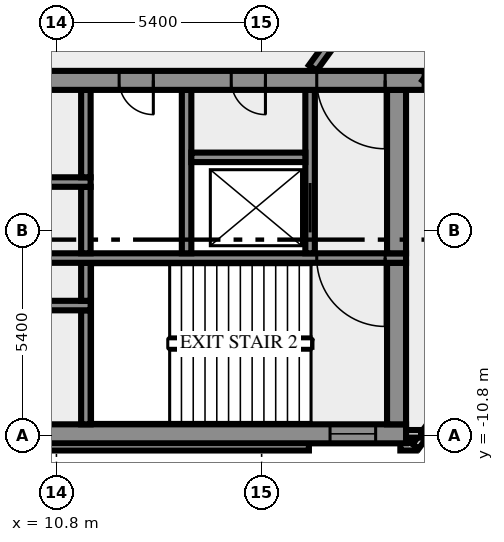
"""IFC4 building model, lengths in metres.
Left out: names, types, materials, properties, quantities, classifications, styles, units other than length and angle.
Written with IfcOpenShell. Run it as: python <this file> out.ifc"""

import sys

from ifc_helpers import new_model, si_unit, direction, frame, frame_2d, origin, place, context, subcontext, project, spatial, rectangle, extrude, element, fill, save


model = new_model("IFC4")
c1 = context("Model", 3, precision=1e-05, world=origin(), true_north=direction((0.0, 1.0)))
c2 = subcontext(c1, "Body", "Model", "MODEL_VIEW")
j1 = project(units=[si_unit("LENGTHUNIT", "METRE"), si_unit("PLANEANGLEUNIT", "RADIAN")], contexts=[c1])
p1 = place(None, origin())
s1 = spatial("IfcSite", under=j1, at=p1, CompositionType="ELEMENT")
p2 = place(p1, origin())
s2 = spatial("IfcBuilding", under=s1, at=p2, CompositionType="ELEMENT")
p3 = place(p2, frame((0.0, 0.0, 331.0)))
s3 = spatial("IfcBuildingStorey", under=s2, at=p3, CompositionType="ELEMENT", Elevation=331.0)
p4 = place(p3, frame((-17.444, -11.088, 0.0), z_axis=(0.0, 0.0, 1.0), x_axis=(1.0, 0.0, 0.0)))
e1 = element("IfcWall", 1, at=p4, inside=s3, PredefinedType="SOLIDWALL", context=c2, shape_type="SweptSolid", body=[
    extrude(rectangle(XDim=34.888, YDim=0.2, at=frame_2d((17.444, 0.0))), origin(), (0.0, 0.0, 1.0), 3.65),
])
p5 = place(p3, frame((19.85, -11.088, 0.0), z_axis=(0.0, 0.0, 1.0), x_axis=(1.0, 0.0, 0.0)))
e2 = element("IfcWall", 2, at=p5, inside=s3, PredefinedType="SOLIDWALL", context=c2, shape_type="SweptSolid", body=[
    extrude(rectangle(XDim=0.406, YDim=0.2, at=frame_2d((0.203, 0.0))), origin(), (0.0, 0.0, 1.0), 3.65),
])
p6 = place(p3, frame((20.253, -11.083, 0.0), z_axis=(0.0, 0.0, 1.0), x_axis=(0.587766567315, 0.809030569476, 0.0)))
e3 = element("IfcWall", 3, at=p6, inside=s3, PredefinedType="SOLIDWALL", context=c2, shape_type="SweptSolid", body=[
    extrude(rectangle(XDim=2.688, YDim=0.2, at=frame_2d((1.344, 0.0))), origin(), (0.0, 0.0, 1.0), 3.65),
])
p7 = place(p3, frame((19.98, -10.75, 0.0), z_axis=(0.0, 0.0, 1.0), x_axis=(1.0, 0.0, 0.0)))
e4 = element("IfcWall", 4, at=p7, inside=s3, PredefinedType="SOLIDWALL", context=c2, shape_type="SweptSolid", body=[
    extrude(rectangle(XDim=0.417, YDim=0.2, at=frame_2d((0.208, 0.0))), origin(), (0.0, 0.0, 1.0), 3.65),
])
p8 = place(p3, frame((-20.0, -10.75, 0.0), z_axis=(0.0, 0.0, 1.0), x_axis=(1.0, 0.0, 0.0)))
e5 = element("IfcWall", 5, at=p8, inside=s3, PredefinedType="SHEAR", context=c2, shape_type="SweptSolid", body=[
    extrude(rectangle(XDim=40.0, YDim=0.5, at=frame_2d((20.0, 0.0))), origin(), (0.0, 0.0, 1.0), 3.65),
])
p9 = place(p8, frame((0.8, 0.0, 1.0)))
e6 = element("IfcOpeningElement", 6, at=p9, cuts=e5, PredefinedType="OPENING", context=c2, shape_type="SweptSolid", body=[
    extrude(rectangle(XDim=1.2, YDim=1.2, at=frame_2d((0.6, 0.6))), frame((0.0, 0.26, 0.0), z_axis=(0.0, -1.0, 0.0), x_axis=(1.0, 0.0, 0.0)), (0.0, 0.0, 1.0), 0.52),
])
p10 = place(p8, frame((38.0, 0.0, 1.0)))
e7 = element("IfcOpeningElement", 7, at=p10, cuts=e5, PredefinedType="OPENING", context=c2, shape_type="SweptSolid", body=[
    extrude(rectangle(XDim=1.2, YDim=1.2, at=frame_2d((0.6, 0.6))), frame((0.0, 0.26, 0.0), z_axis=(0.0, -1.0, 0.0), x_axis=(1.0, 0.0, 0.0)), (0.0, 0.0, 1.0), 0.52),
])
p11 = place(p3, frame((11.575, -10.5, 0.0), z_axis=(0.0, 0.0, 1.0), x_axis=(0.0, 1.0, 0.0)))
e8 = element("IfcWall", 8, at=p11, inside=s3, PredefinedType="SHEAR", context=c2, shape_type="SweptSolid", body=[
    extrude(rectangle(XDim=3.0, YDim=0.25, at=frame_2d((1.5, 0.0))), origin(), (0.0, 0.0, 1.0), 3.65),
])
p12 = place(p3, frame((19.75, -10.5, 0.0), z_axis=(0.0, 0.0, 1.0), x_axis=(0.0, 1.0, 0.0)))
e9 = element("IfcWall", 9, at=p12, inside=s3, PredefinedType="SHEAR", context=c2, shape_type="SweptSolid", body=[
    extrude(rectangle(XDim=4.25, YDim=0.5, at=frame_2d((2.125, 0.0))), origin(), (0.0, 0.0, 1.0), 3.65),
])
p13 = place(p3, frame((11.7, -7.375, 0.0), z_axis=(0.0, 0.0, 1.0), x_axis=(-1.0, 0.0, 0.0)))
e10 = element("IfcWall", 10, at=p13, inside=s3, PredefinedType="SHEAR", context=c2, shape_type="SweptSolid", body=[
    extrude(rectangle(XDim=23.4, YDim=0.25, at=frame_2d((11.7, 0.0))), origin(), (0.0, 0.0, 1.0), 3.65),
])
p14 = place(p13, frame((22.225, 0.0, 0.0)))
e11 = element("IfcOpeningElement", 11, at=p14, cuts=e10, PredefinedType="OPENING", context=c2, shape_type="SweptSolid", body=[
    extrude(rectangle(XDim=0.8, YDim=2.1, at=frame_2d((0.4, 1.05))), frame((0.0, 0.135, 0.0), z_axis=(0.0, -1.0, 0.0), x_axis=(1.0, 0.0, 0.0)), (0.0, 0.0, 1.0), 0.27),
])
p15 = place(p13, frame((20.2, 0.0, 0.0)))
e12 = element("IfcOpeningElement", 12, at=p15, cuts=e10, PredefinedType="OPENING", context=c2, shape_type="SweptSolid", body=[
    extrude(rectangle(XDim=1.1, YDim=2.1, at=frame_2d((0.55, 1.05))), frame((0.0, 0.135, 0.0), z_axis=(0.0, -1.0, 0.0), x_axis=(1.0, 0.0, 0.0)), (0.0, 0.0, 1.0), 0.27),
])
p16 = place(p13, frame((17.7, 0.0, 0.0)))
e13 = element("IfcOpeningElement", 13, at=p16, cuts=e10, PredefinedType="OPENING", context=c2, shape_type="SweptSolid", body=[
    extrude(rectangle(XDim=1.1, YDim=2.1, at=frame_2d((0.55, 1.05))), frame((0.0, 0.135, 0.0), z_axis=(0.0, -1.0, 0.0), x_axis=(1.0, 0.0, 0.0)), (0.0, 0.0, 1.0), 0.27),
])
p17 = place(p13, frame((15.975, 0.0, 0.0)))
e14 = element("IfcOpeningElement", 14, at=p17, cuts=e10, PredefinedType="OPENING", context=c2, shape_type="SweptSolid", body=[
    extrude(rectangle(XDim=0.8, YDim=2.1, at=frame_2d((0.4, 1.05))), frame((0.0, 0.135, 0.0), z_axis=(0.0, -1.0, 0.0), x_axis=(1.0, 0.0, 0.0)), (0.0, 0.0, 1.0), 0.27),
])
p18 = place(p13, frame((14.2, 0.0, 0.0)))
e15 = element("IfcOpeningElement", 15, at=p18, cuts=e10, PredefinedType="OPENING", context=c2, shape_type="SweptSolid", body=[
    extrude(rectangle(XDim=0.9, YDim=2.1, at=frame_2d((0.45, 1.05))), frame((0.0, 0.135, 0.0), z_axis=(0.0, -1.0, 0.0), x_axis=(1.0, 0.0, 0.0)), (0.0, 0.0, 1.0), 0.27),
])
p19 = place(p13, frame((12.35, 0.0, 0.0)))
e16 = element("IfcOpeningElement", 16, at=p19, cuts=e10, PredefinedType="OPENING", context=c2, shape_type="SweptSolid", body=[
    extrude(rectangle(XDim=0.9, YDim=2.1, at=frame_2d((0.45, 1.05))), frame((0.0, 0.135, 0.0), z_axis=(0.0, -1.0, 0.0), x_axis=(1.0, 0.0, 0.0)), (0.0, 0.0, 1.0), 0.27),
])
p20 = place(p13, frame((10.65, 0.0, 0.0)))
e17 = element("IfcOpeningElement", 17, at=p20, cuts=e10, PredefinedType="OPENING", context=c2, shape_type="SweptSolid", body=[
    extrude(rectangle(XDim=0.9, YDim=2.1, at=frame_2d((0.45, 1.05))), frame((0.0, 0.135, 0.0), z_axis=(0.0, -1.0, 0.0), x_axis=(1.0, 0.0, 0.0)), (0.0, 0.0, 1.0), 0.27),
])
p21 = place(p13, frame((7.713, 0.0, 0.0)))
e18 = element("IfcOpeningElement", 18, at=p21, cuts=e10, PredefinedType="OPENING", context=c2, shape_type="SweptSolid", body=[
    extrude(rectangle(XDim=0.9, YDim=2.1, at=frame_2d((0.45, 1.05))), frame((0.0, 0.135, 0.0), z_axis=(0.0, -1.0, 0.0), x_axis=(1.0, 0.0, 0.0)), (0.0, 0.0, 1.0), 0.27),
])
p22 = place(p13, frame((4.15, 0.0, 0.0)))
e19 = element("IfcOpeningElement", 19, at=p22, cuts=e10, PredefinedType="OPENING", context=c2, shape_type="SweptSolid", body=[
    extrude(rectangle(XDim=0.9, YDim=2.1, at=frame_2d((0.45, 1.05))), frame((0.0, 0.135, 0.0), z_axis=(0.0, -1.0, 0.0), x_axis=(1.0, 0.0, 0.0)), (0.0, 0.0, 1.0), 0.27),
])
p23 = place(p13, frame((1.138, 0.0, 0.0)))
e20 = element("IfcOpeningElement", 20, at=p23, cuts=e10, PredefinedType="OPENING", context=c2, shape_type="SweptSolid", body=[
    extrude(rectangle(XDim=0.9, YDim=2.1, at=frame_2d((0.45, 1.05))), frame((0.0, 0.135, 0.0), z_axis=(0.0, -1.0, 0.0), x_axis=(1.0, 0.0, 0.0)), (0.0, 0.0, 1.0), 0.27),
])
p24 = place(p3, frame((11.575, -7.25, 0.0), z_axis=(0.0, 0.0, 1.0), x_axis=(0.0, 1.0, 0.0)))
e21 = element("IfcWall", 21, at=p24, inside=s3, PredefinedType="SHEAR", context=c2, shape_type="SweptSolid", body=[
    extrude(rectangle(XDim=1.0, YDim=0.25, at=frame_2d((0.5, 0.0))), origin(), (0.0, 0.0, 1.0), 3.65),
])
p25 = place(p3, frame((20.0, -6.125, 0.0), z_axis=(0.0, 0.0, 1.0), x_axis=(-1.0, 0.0, 0.0)))
e22 = element("IfcWall", 22, at=p25, inside=s3, PredefinedType="SHEAR", context=c2, shape_type="SweptSolid", body=[
    extrude(rectangle(XDim=10.8, YDim=0.25, at=frame_2d((5.4, 0.0))), origin(), (0.0, 0.0, 1.0), 3.65),
])
p26 = place(p25, frame((0.55, 0.0, 0.0)))
e23 = element("IfcOpeningElement", 23, at=p26, cuts=e22, PredefinedType="OPENING", context=c2, shape_type="SweptSolid", body=[
    extrude(rectangle(XDim=1.8, YDim=2.1, at=frame_2d((0.9, 1.05))), frame((0.0, 0.135, 0.0), z_axis=(0.0, -1.0, 0.0), x_axis=(1.0, 0.0, 0.0)), (0.0, 0.0, 1.0), 0.27),
])
p27 = place(p3, frame((11.575, -6.0, 0.0), z_axis=(0.0, 0.0, 1.0), x_axis=(0.0, 1.0, 0.0)))
e24 = element("IfcWall", 24, at=p27, inside=s3, PredefinedType="SHEAR", context=c2, shape_type="SweptSolid", body=[
    extrude(rectangle(XDim=1.75, YDim=0.25, at=frame_2d((0.875, 0.0))), origin(), (0.0, 0.0, 1.0), 3.65),
])
p28 = place(p3, frame((14.225, -6.0, 0.0), z_axis=(0.0, 0.0, 1.0), x_axis=(0.0, 1.0, 0.0)))
e25 = element("IfcWall", 25, at=p28, inside=s3, PredefinedType="SHEAR", context=c2, shape_type="SweptSolid", body=[
    extrude(rectangle(XDim=4.3, YDim=0.25, at=frame_2d((2.15, 0.0))), origin(), (0.0, 0.0, 1.0), 3.65),
])
p29 = place(p3, frame((17.475, -6.0, 0.0), z_axis=(0.0, 0.0, 1.0), x_axis=(0.0, 1.0, 0.0)))
e26 = element("IfcWall", 26, at=p29, inside=s3, PredefinedType="SHEAR", context=c2, shape_type="SweptSolid", body=[
    extrude(rectangle(XDim=4.3, YDim=0.25, at=frame_2d((2.15, 0.0))), origin(), (0.0, 0.0, 1.0), 3.65),
])
p30 = place(p29, frame((0.55, 0.0, 0.0)))
e27 = element("IfcOpeningElement", 27, at=p30, cuts=e26, PredefinedType="OPENING", context=c2, shape_type="SweptSolid", body=[
    extrude(rectangle(XDim=1.3, YDim=2.1, at=frame_2d((0.65, 1.05))), frame((0.0, 0.135, 0.0), z_axis=(0.0, -1.0, 0.0), x_axis=(1.0, 0.0, 0.0)), (0.0, 0.0, 1.0), 0.27),
])
p31 = place(p3, frame((19.75, -6.0, 0.0), z_axis=(0.0, 0.0, 1.0), x_axis=(0.0, 1.0, 0.0)))
e28 = element("IfcWall", 28, at=p31, inside=s3, PredefinedType="SHEAR", context=c2, shape_type="SweptSolid", body=[
    extrude(rectangle(XDim=4.3, YDim=0.5, at=frame_2d((2.15, 0.0))), origin(), (0.0, 0.0, 1.0), 3.65),
])
p32 = place(p3, frame((1.45, -4.125, 0.0), z_axis=(0.0, 0.0, 1.0), x_axis=(1.0, 0.0, 0.0)))
e29 = element("IfcWall", 29, at=p32, inside=s3, PredefinedType="SHEAR", context=c2, shape_type="SweptSolid", body=[
    extrude(rectangle(XDim=10.25, YDim=0.25, at=frame_2d((5.125, 0.0))), origin(), (0.0, 0.0, 1.0), 3.65),
])
p33 = place(p32, frame((0.7, 0.0, 0.0)))
e30 = element("IfcOpeningElement", 30, at=p33, cuts=e29, PredefinedType="OPENING", context=c2, shape_type="SweptSolid", body=[
    extrude(rectangle(XDim=1.3, YDim=2.1, at=frame_2d((0.65, 1.05))), frame((0.0, 0.135, 0.0), z_axis=(0.0, -1.0, 0.0), x_axis=(1.0, 0.0, 0.0)), (0.0, 0.0, 1.0), 0.27),
])
p34 = place(p3, frame((11.575, -4.0, 0.0), z_axis=(0.0, 0.0, 1.0), x_axis=(0.0, 1.0, 0.0)))
e31 = element("IfcWall", 31, at=p34, inside=s3, PredefinedType="SHEAR", context=c2, shape_type="SweptSolid", body=[
    extrude(rectangle(XDim=2.3, YDim=0.25, at=frame_2d((1.15, 0.0))), origin(), (0.0, 0.0, 1.0), 3.65),
])
p35 = place(p3, frame((14.35, -3.475, 0.0), z_axis=(0.0, 0.0, 1.0), x_axis=(1.0, 0.0, 0.0)))
e32 = element("IfcWall", 32, at=p35, inside=s3, PredefinedType="SHEAR", context=c2, shape_type="SweptSolid", body=[
    extrude(rectangle(XDim=3.0, YDim=0.25, at=frame_2d((1.5, 0.0))), origin(), (0.0, 0.0, 1.0), 3.65),
])
p36 = place(p3, frame((20.49, -1.45, 0.0), z_axis=(0.0, 0.0, 1.0), x_axis=(-1.0, 0.0, 0.0)))
e33 = element("IfcWall", 33, at=p36, inside=s3, PredefinedType="SHEAR", context=c2, shape_type="SweptSolid", body=[
    extrude(rectangle(XDim=40.98, YDim=0.5, at=frame_2d((20.49, 0.0))), origin(), (0.0, 0.0, 1.0), 3.65),
])
p37 = place(p36, frame((38.14, 0.0, 0.0)))
e34 = element("IfcOpeningElement", 34, at=p37, cuts=e33, PredefinedType="OPENING", context=c2, shape_type="SweptSolid", body=[
    extrude(rectangle(XDim=1.8, YDim=2.1, at=frame_2d((0.9, 1.05))), frame((0.0, 0.26, 0.0), z_axis=(0.0, -1.0, 0.0), x_axis=(1.0, 0.0, 0.0)), (0.0, 0.0, 1.0), 0.52),
])
p38 = place(p36, frame((36.728, 0.0, 0.0)))
e35 = element("IfcOpeningElement", 35, at=p38, cuts=e33, PredefinedType="OPENING", context=c2, shape_type="SweptSolid", body=[
    extrude(rectangle(XDim=0.8, YDim=2.1, at=frame_2d((0.4, 1.05))), frame((0.0, 0.26, 0.0), z_axis=(0.0, -1.0, 0.0), x_axis=(1.0, 0.0, 0.0)), (0.0, 0.0, 1.0), 0.52),
])
p39 = place(p36, frame((35.153, 0.0, 0.0)))
e36 = element("IfcOpeningElement", 36, at=p39, cuts=e33, PredefinedType="OPENING", context=c2, shape_type="SweptSolid", body=[
    extrude(rectangle(XDim=0.8, YDim=2.1, at=frame_2d((0.4, 1.05))), frame((0.0, 0.26, 0.0), z_axis=(0.0, -1.0, 0.0), x_axis=(1.0, 0.0, 0.0)), (0.0, 0.0, 1.0), 0.52),
])
p40 = place(p36, frame((32.94, 0.0, 0.0)))
e37 = element("IfcOpeningElement", 37, at=p40, cuts=e33, PredefinedType="OPENING", context=c2, shape_type="SweptSolid", body=[
    extrude(rectangle(XDim=0.9, YDim=2.1, at=frame_2d((0.45, 1.05))), frame((0.0, 0.26, 0.0), z_axis=(0.0, -1.0, 0.0), x_axis=(1.0, 0.0, 0.0)), (0.0, 0.0, 1.0), 0.52),
])
p41 = place(p36, frame((31.015, 0.0, 0.0)))
e38 = element("IfcOpeningElement", 38, at=p41, cuts=e33, PredefinedType="OPENING", context=c2, shape_type="SweptSolid", body=[
    extrude(rectangle(XDim=0.8, YDim=2.1, at=frame_2d((0.4, 1.05))), frame((0.0, 0.26, 0.0), z_axis=(0.0, -1.0, 0.0), x_axis=(1.0, 0.0, 0.0)), (0.0, 0.0, 1.0), 0.52),
])
p42 = place(p36, frame((24.765, 0.0, 0.0)))
e39 = element("IfcOpeningElement", 39, at=p42, cuts=e33, PredefinedType="OPENING", context=c2, shape_type="SweptSolid", body=[
    extrude(rectangle(XDim=0.8, YDim=2.1, at=frame_2d((0.4, 1.05))), frame((0.0, 0.26, 0.0), z_axis=(0.0, -1.0, 0.0), x_axis=(1.0, 0.0, 0.0)), (0.0, 0.0, 1.0), 0.52),
])
p43 = place(p36, frame((19.59, 0.0, 0.0)))
e40 = element("IfcOpeningElement", 40, at=p43, cuts=e33, PredefinedType="OPENING", context=c2, shape_type="SweptSolid", body=[
    extrude(rectangle(XDim=2.0, YDim=2.1, at=frame_2d((1.0, 1.05))), frame((0.0, 0.26, 0.0), z_axis=(0.0, -1.0, 0.0), x_axis=(1.0, 0.0, 0.0)), (0.0, 0.0, 1.0), 0.52),
])
p44 = place(p36, frame((15.103, 0.0, 0.0)))
e41 = element("IfcOpeningElement", 41, at=p44, cuts=e33, PredefinedType="OPENING", context=c2, shape_type="SweptSolid", body=[
    extrude(rectangle(XDim=0.9, YDim=2.1, at=frame_2d((0.45, 1.05))), frame((0.0, 0.26, 0.0), z_axis=(0.0, -1.0, 0.0), x_axis=(1.0, 0.0, 0.0)), (0.0, 0.0, 1.0), 0.52),
])
p45 = place(p36, frame((13.04, 0.0, 0.0)))
e42 = element("IfcOpeningElement", 42, at=p45, cuts=e33, PredefinedType="OPENING", context=c2, shape_type="SweptSolid", body=[
    extrude(rectangle(XDim=0.9, YDim=2.1, at=frame_2d((0.45, 1.05))), frame((0.0, 0.26, 0.0), z_axis=(0.0, -1.0, 0.0), x_axis=(1.0, 0.0, 0.0)), (0.0, 0.0, 1.0), 0.52),
])
p46 = place(p36, frame((10.177, 0.0, 0.0)))
e43 = element("IfcOpeningElement", 43, at=p46, cuts=e33, PredefinedType="OPENING", context=c2, shape_type="SweptSolid", body=[
    extrude(rectangle(XDim=0.9, YDim=2.1, at=frame_2d((0.45, 1.05))), frame((0.0, 0.26, 0.0), z_axis=(0.0, -1.0, 0.0), x_axis=(1.0, 0.0, 0.0)), (0.0, 0.0, 1.0), 0.52),
])
p47 = place(p36, frame((7.14, 0.0, 0.0)))
e44 = element("IfcOpeningElement", 44, at=p47, cuts=e33, PredefinedType="OPENING", context=c2, shape_type="SweptSolid", body=[
    extrude(rectangle(XDim=0.9, YDim=2.1, at=frame_2d((0.45, 1.05))), frame((0.0, 0.26, 0.0), z_axis=(0.0, -1.0, 0.0), x_axis=(1.0, 0.0, 0.0)), (0.0, 0.0, 1.0), 0.52),
])
p48 = place(p36, frame((4.19, 0.0, 0.0)))
e45 = element("IfcOpeningElement", 45, at=p48, cuts=e33, PredefinedType="OPENING", context=c2, shape_type="SweptSolid", body=[
    extrude(rectangle(XDim=0.9, YDim=2.1, at=frame_2d((0.45, 1.05))), frame((0.0, 0.26, 0.0), z_axis=(0.0, -1.0, 0.0), x_axis=(1.0, 0.0, 0.0)), (0.0, 0.0, 1.0), 0.52),
])
p49 = place(p36, frame((1.04, 0.0, 0.0)))
e46 = element("IfcOpeningElement", 46, at=p49, cuts=e33, PredefinedType="OPENING", context=c2, shape_type="SweptSolid", body=[
    extrude(rectangle(XDim=1.8, YDim=2.1, at=frame_2d((0.9, 1.05))), frame((0.0, 0.26, 0.0), z_axis=(0.0, -1.0, 0.0), x_axis=(1.0, 0.0, 0.0)), (0.0, 0.0, 1.0), 0.52),
])
p50 = place(p3, frame((17.545, -1.125, 0.0), z_axis=(0.0, 0.0, 1.0), x_axis=(0.58779555165, 0.809009511354, 0.0)))
e47 = element("IfcWall", 47, at=p50, inside=s3, PredefinedType="SOLIDWALL", context=c2, shape_type="SweptSolid", body=[
    extrude(rectangle(XDim=18.103, YDim=0.25, at=frame_2d((9.052, 0.0))), origin(), (0.0, 0.0, 1.0), 3.65),
])
p51 = place(p50, frame((16.728, 0.0, 0.0)))
e48 = element("IfcOpeningElement", 48, at=p51, cuts=e47, PredefinedType="OPENING", context=c2, shape_type="SweptSolid", body=[
    extrude(rectangle(XDim=0.9, YDim=2.1, at=frame_2d((0.45, 1.05))), frame((0.0, 0.135, 0.0), z_axis=(0.0, -1.0, 0.0), x_axis=(1.0, 0.0, 0.0)), (0.0, 0.0, 1.0), 0.27),
])
p52 = place(p3, frame((30.183, 11.761, 0.0), z_axis=(0.0, 0.0, 1.0), x_axis=(-0.587781762867, -0.80901952958, 0.0)))
e49 = element("IfcWall", 49, at=p52, inside=s3, PredefinedType="SOLIDWALL", context=c2, shape_type="SweptSolid", body=[
    extrude(rectangle(XDim=16.42, YDim=0.25, at=frame_2d((8.21, 0.0))), origin(), (0.0, 0.0, 1.0), 3.65),
])
p53 = place(p52, frame((0.225, 0.0, 0.0)))
e50 = element("IfcOpeningElement", 50, at=p53, cuts=e49, PredefinedType="OPENING", context=c2, shape_type="SweptSolid", body=[
    extrude(rectangle(XDim=0.9, YDim=2.1, at=frame_2d((0.45, 1.05))), frame((0.0, 0.135, 0.0), z_axis=(0.0, -1.0, 0.0), x_axis=(1.0, 0.0, 0.0)), (0.0, 0.0, 1.0), 0.27),
])
p54 = place(p52, frame((9.304, 0.0, 0.0)))
e51 = element("IfcOpeningElement", 51, at=p54, cuts=e49, PredefinedType="OPENING", context=c2, shape_type="SweptSolid", body=[
    extrude(rectangle(XDim=0.9, YDim=2.1, at=frame_2d((0.45, 1.05))), frame((0.0, 0.135, 0.0), z_axis=(0.0, -1.0, 0.0), x_axis=(1.0, 0.0, 0.0)), (0.0, 0.0, 1.0), 0.27),
])
p55 = place(p10, origin())
e52 = element("IfcWindow", 52, at=p55, inside=s3, PartitioningType="SINGLE_PANEL", PredefinedType="WINDOW", context=c2, shape_type="SweptSolid", body=[
    extrude(rectangle(XDim=1.2, YDim=1.2, at=frame_2d((0.6, 0.6))), frame((0.0, 0.03, 0.0), z_axis=(0.0, -1.0, 0.0), x_axis=(1.0, 0.0, 0.0)), (0.0, 0.0, 1.0), 0.06),
])
fill(e7, e52)
p56 = place(p26, origin())
e53 = element("IfcDoor", 53, at=p56, inside=s3, OperationType="DOUBLE_DOOR_SINGLE_SWING", PredefinedType="DOOR", context=c2, shape_type="SweptSolid", body=[
    extrude(rectangle(XDim=1.8, YDim=2.1, at=frame_2d((0.9, 1.05))), frame((0.0, 0.025, 0.0), z_axis=(0.0, -1.0, 0.0), x_axis=(1.0, 0.0, 0.0)), (0.0, 0.0, 1.0), 0.05),
])
fill(e23, e53)
p57 = place(p30, origin())
e54 = element("IfcDoor", 54, at=p57, inside=s3, OperationType="DOUBLE_DOOR_SLIDING", PredefinedType="DOOR", context=c2, shape_type="SweptSolid", body=[
    extrude(rectangle(XDim=1.3, YDim=2.1, at=frame_2d((0.65, 1.05))), frame((0.0, 0.025, 0.0), z_axis=(0.0, -1.0, 0.0), x_axis=(1.0, 0.0, 0.0)), (0.0, 0.0, 1.0), 0.05),
])
fill(e27, e54)
p58 = place(p47, origin())
e55 = element("IfcDoor", 55, at=p58, inside=s3, OperationType="SINGLE_SWING_LEFT", PredefinedType="DOOR", context=c2, shape_type="SweptSolid", body=[
    extrude(rectangle(XDim=0.9, YDim=2.1, at=frame_2d((0.45, 1.05))), frame((0.0, 0.025, 0.0), z_axis=(0.0, -1.0, 0.0), x_axis=(1.0, 0.0, 0.0)), (0.0, 0.0, 1.0), 0.05),
])
fill(e44, e55)
p59 = place(p48, origin())
e56 = element("IfcDoor", 56, at=p59, inside=s3, OperationType="SINGLE_SWING_LEFT", PredefinedType="DOOR", context=c2, shape_type="SweptSolid", body=[
    extrude(rectangle(XDim=0.9, YDim=2.1, at=frame_2d((0.45, 1.05))), frame((0.0, 0.025, 0.0), z_axis=(0.0, -1.0, 0.0), x_axis=(1.0, 0.0, 0.0)), (0.0, 0.0, 1.0), 0.05),
])
fill(e45, e56)
p60 = place(p49, origin())
e57 = element("IfcDoor", 57, at=p60, inside=s3, OperationType="DOUBLE_DOOR_SINGLE_SWING", PredefinedType="DOOR", context=c2, shape_type="SweptSolid", body=[
    extrude(rectangle(XDim=1.8, YDim=2.1, at=frame_2d((0.9, 1.05))), frame((0.0, 0.025, 0.0), z_axis=(0.0, -1.0, 0.0), x_axis=(1.0, 0.0, 0.0)), (0.0, 0.0, 1.0), 0.05),
])
fill(e46, e57)
save(model, sys.argv[1])
